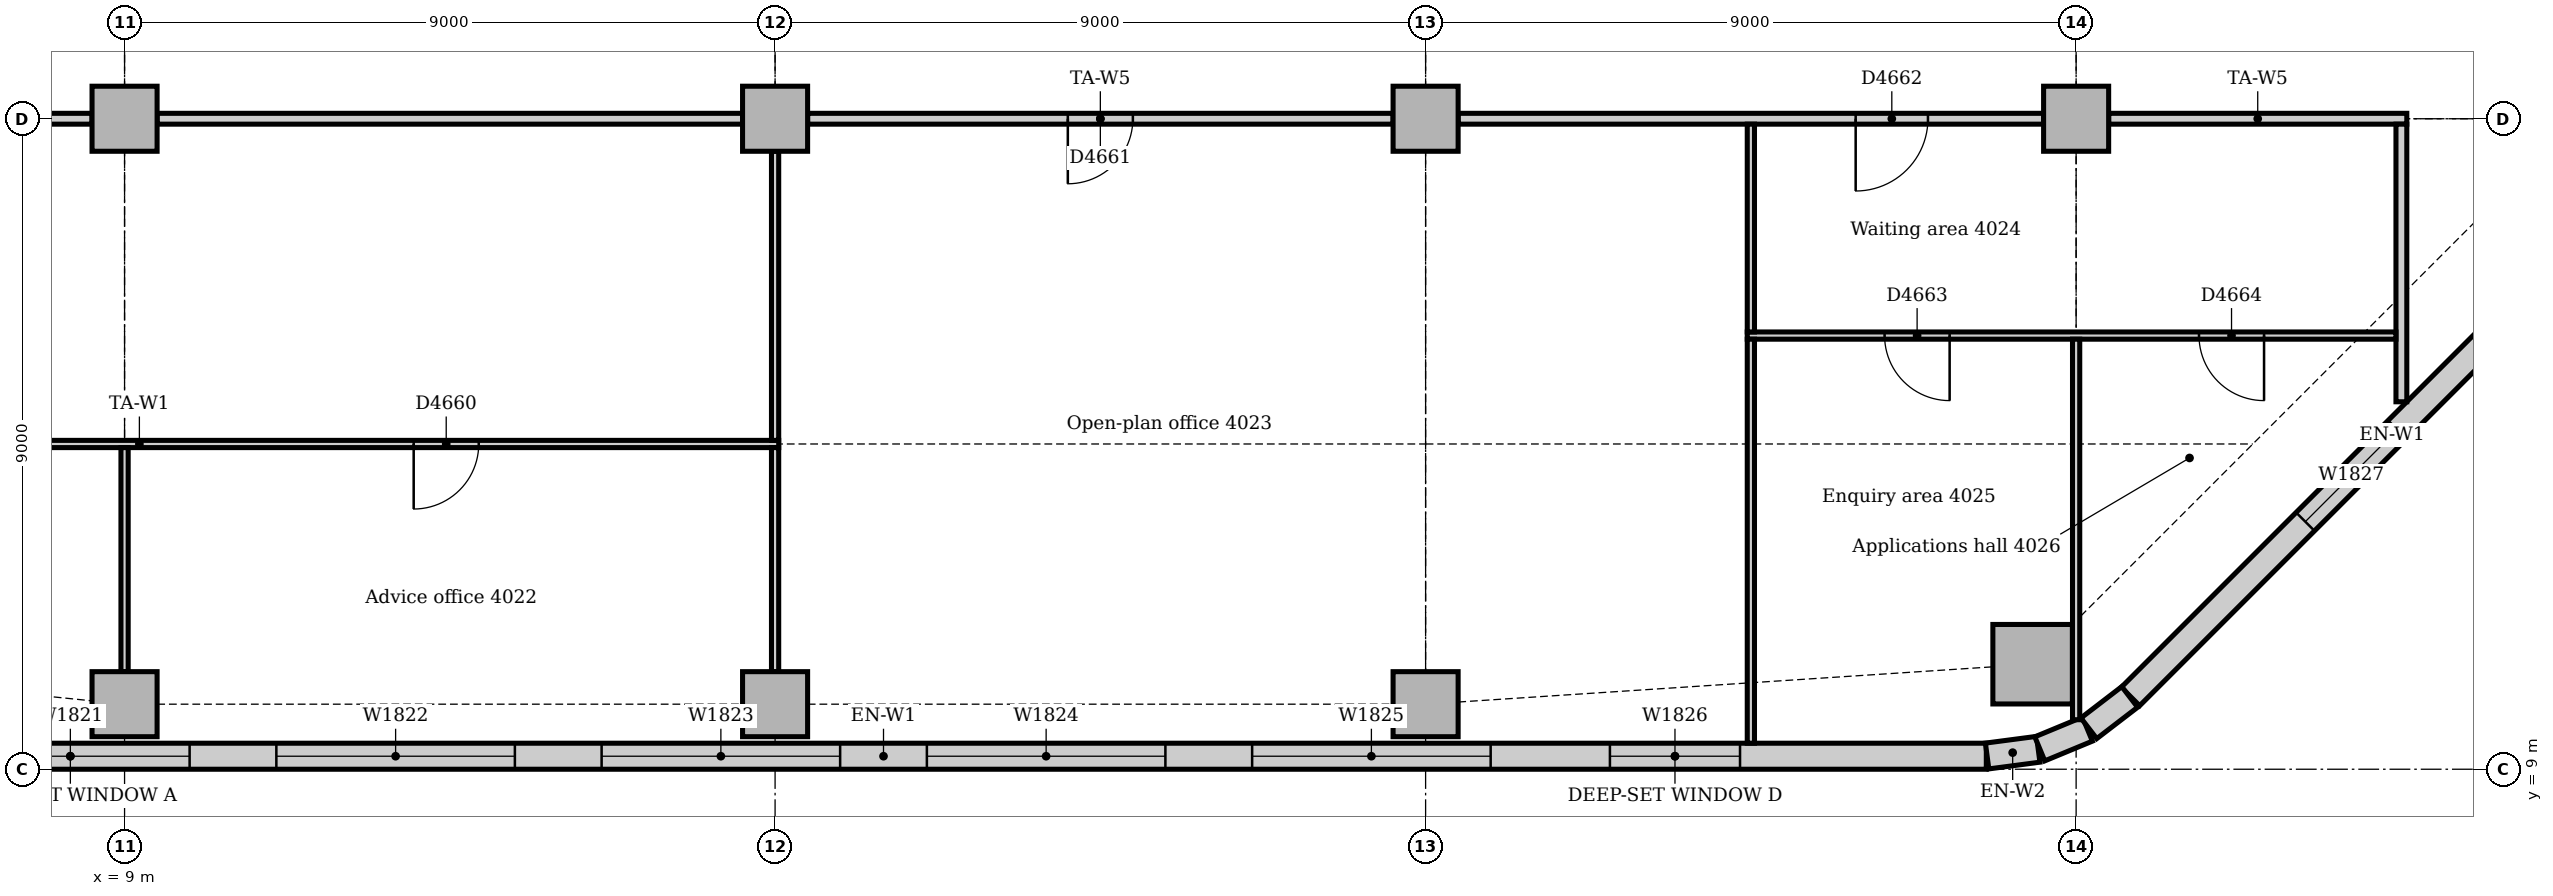
"""IFC4 building model, lengths in metres.
Left out: names, types, materials, properties, quantities, classifications, styles, units other than length and angle.
Written with IfcOpenShell. Run it as: python <this file> out.ifc"""

import sys

from ifc_helpers import new_model, si_unit, direction, frame, frame_2d, origin, origin_2d, place, context, subcontext, project, spatial, rectangle, extrude, element, fill, save


model = new_model("IFC4")
c1 = context("Model", 3, precision=1e-05, world=origin(), true_north=direction((0.0, 1.0)))
c2 = subcontext(c1, "Body", "Model", "MODEL_VIEW")
j1 = project(units=[si_unit("LENGTHUNIT", "METRE"), si_unit("PLANEANGLEUNIT", "RADIAN")], contexts=[c1])
p1 = place(None, origin())
s1 = spatial("IfcSite", under=j1, at=p1, CompositionType="ELEMENT")
p2 = place(p1, origin())
s2 = spatial("IfcBuilding", under=s1, at=p2, CompositionType="ELEMENT")
p3 = place(p2, frame((0.0, 0.0, 169.0)))
s3 = spatial("IfcBuildingStorey", under=s2, at=p3, CompositionType="ELEMENT", Elevation=169.0)
p4 = place(p3, frame((35.398, 10.453, 0.0), z_axis=(0.0, 0.0, 1.0), x_axis=(1.0, 0.0, 0.0)))
e1 = element("IfcColumn", 1, at=p4, inside=s3, PredefinedType="COLUMN", context=c2, shape_type="SweptSolid", body=[
    extrude(rectangle(XDim=1.1, YDim=1.1, at=origin_2d()), origin(), (0.0, 0.0, 1.0), 3.85),
])
for number, where, z_axis, x_axis in (
    (2, (9.0, 9.9, 0.0), (0.0, 0.0, 1.0), (1.0, 0.0, 0.0)),
    (3, (18.0, 9.9, 0.0), (0.0, 0.0, 1.0), (1.0, 0.0, 0.0)),
    (4, (27.0, 9.9, 0.0), (0.0, 0.0, 1.0), (1.0, 0.0, 0.0)),
    (5, (9.0, 18.0, 0.0), (0.0, 0.0, 1.0), (1.0, 0.0, 0.0)),
    (6, (18.0, 18.0, 0.0), (0.0, 0.0, 1.0), (1.0, 0.0, 0.0)),
    (7, (27.0, 18.0, 0.0), (0.0, 0.0, 1.0), (1.0, 0.0, 0.0)),
    (8, (36.0, 18.0, 0.0), (0.0, 0.0, 1.0), (1.0, 0.0, 0.0)),
):
    element("IfcColumn", number, at=place(p3, frame(where, z_axis=z_axis, x_axis=x_axis)), inside=s3, PredefinedType="COLUMN", context=c2, shape_type="SweptSolid", body=[
        extrude(rectangle(XDim=0.9, YDim=0.9, at=origin_2d()), origin(), (0.0, 0.0, 1.0), 3.85),
    ])
p5 = place(p3, frame((4.243, 9.18, 0.0), z_axis=(0.0, 0.0, 1.0), x_axis=(1.0, 0.0, 0.0)))
e9 = element("IfcWall", 9, at=p5, inside=s3, PredefinedType="STANDARD", context=c2, shape_type="SweptSolid", body=[
    extrude(rectangle(XDim=30.515, YDim=0.36, at=frame_2d((15.257, 0.0))), origin(), (0.0, 0.0, 1.0), 3.85),
])
p6 = place(p5, frame((2.357, 0.0, 0.9)))
e10 = element("IfcOpeningElement", 10, at=p6, cuts=e9, PredefinedType="OPENING", context=c2, shape_type="SweptSolid", body=[
    extrude(rectangle(XDim=3.3, YDim=1.6, at=frame_2d((1.65, 0.8))), frame((0.0, 0.19, 0.0), z_axis=(0.0, -1.0, 0.0), x_axis=(1.0, 0.0, 0.0)), (0.0, 0.0, 1.0), 0.38),
])
p7 = place(p5, frame((6.857, 0.0, 0.9)))
e11 = element("IfcOpeningElement", 11, at=p7, cuts=e9, PredefinedType="OPENING", context=c2, shape_type="SweptSolid", body=[
    extrude(rectangle(XDim=3.3, YDim=1.6, at=frame_2d((1.65, 0.8))), frame((0.0, 0.19, 0.0), z_axis=(0.0, -1.0, 0.0), x_axis=(1.0, 0.0, 0.0)), (0.0, 0.0, 1.0), 0.38),
])
p8 = place(p5, frame((11.357, 0.0, 0.9)))
e12 = element("IfcOpeningElement", 12, at=p8, cuts=e9, PredefinedType="OPENING", context=c2, shape_type="SweptSolid", body=[
    extrude(rectangle(XDim=3.3, YDim=1.6, at=frame_2d((1.65, 0.8))), frame((0.0, 0.19, 0.0), z_axis=(0.0, -1.0, 0.0), x_axis=(1.0, 0.0, 0.0)), (0.0, 0.0, 1.0), 0.38),
])
p9 = place(p5, frame((15.857, 0.0, 0.9)))
e13 = element("IfcOpeningElement", 13, at=p9, cuts=e9, PredefinedType="OPENING", context=c2, shape_type="SweptSolid", body=[
    extrude(rectangle(XDim=3.3, YDim=1.6, at=frame_2d((1.65, 0.8))), frame((0.0, 0.19, 0.0), z_axis=(0.0, -1.0, 0.0), x_axis=(1.0, 0.0, 0.0)), (0.0, 0.0, 1.0), 0.38),
])
p10 = place(p5, frame((20.357, 0.0, 0.9)))
e14 = element("IfcOpeningElement", 14, at=p10, cuts=e9, PredefinedType="OPENING", context=c2, shape_type="SweptSolid", body=[
    extrude(rectangle(XDim=3.3, YDim=1.6, at=frame_2d((1.65, 0.8))), frame((0.0, 0.19, 0.0), z_axis=(0.0, -1.0, 0.0), x_axis=(1.0, 0.0, 0.0)), (0.0, 0.0, 1.0), 0.38),
])
p11 = place(p5, frame((25.307, 0.0, 0.9)))
e15 = element("IfcOpeningElement", 15, at=p11, cuts=e9, PredefinedType="OPENING", context=c2, shape_type="SweptSolid", body=[
    extrude(rectangle(XDim=1.8, YDim=1.6, at=frame_2d((0.9, 0.8))), frame((0.0, 0.19, 0.0), z_axis=(0.0, -1.0, 0.0), x_axis=(1.0, 0.0, 0.0)), (0.0, 0.0, 1.0), 0.38),
])
p12 = place(p3, frame((36.751, 10.006, 0.0), z_axis=(0.0, 0.0, 1.0), x_axis=(0.707106781187, 0.707106781187, 0.0)))
e16 = element("IfcWall", 16, at=p12, inside=s3, PredefinedType="STANDARD", context=c2, shape_type="SweptSolid", body=[
    extrude(rectangle(XDim=10.243, YDim=0.36, at=frame_2d((5.121, 0.0))), origin(), (0.0, 0.0, 1.0), 3.85),
])
p13 = place(p12, frame((3.421, 0.0, 0.9)))
e17 = element("IfcOpeningElement", 17, at=p13, cuts=e16, PredefinedType="OPENING", context=c2, shape_type="SweptSolid", body=[
    extrude(rectangle(XDim=1.8, YDim=1.6, at=frame_2d((0.9, 0.8))), frame((0.0, 0.19, 0.0), z_axis=(0.0, -1.0, 0.0), x_axis=(1.0, 0.0, 0.0)), (0.0, 0.0, 1.0), 0.38),
])
for number, where, z_axis, x_axis in (
    (18, (34.769, 9.183, 0.0), (0.0, 0.0, 1.0), (0.991, 0.131, 0.0)),
    (19, (35.497, 9.282, 0.0), (0.0, 0.0, 1.0), (0.924, 0.383, 0.0)),
):
    element("IfcWall", number, at=place(p3, frame(where, z_axis=z_axis, x_axis=x_axis)), inside=s3, PredefinedType="STANDARD", context=c2, shape_type="SweptSolid", body=[
        extrude(rectangle(XDim=0.713, YDim=0.36, at=frame_2d((0.356, 0.0))), origin(), (0.0, 0.0, 1.0), 3.85),
    ])
p14 = place(p3, frame((36.175, 9.566, 0.0), z_axis=(0.0, 0.0, 1.0), x_axis=(0.793321924995, 0.608802368033, 0.0)))
e20 = element("IfcWall", 20, at=p14, inside=s3, PredefinedType="STANDARD", context=c2, shape_type="SweptSolid", body=[
    extrude(rectangle(XDim=0.713, YDim=0.36, at=frame_2d((0.357, 0.0))), origin(), (0.0, 0.0, 1.0), 3.85),
])
p15 = place(p3, frame((1.35, 18.0, 0.0), z_axis=(0.0, 0.0, 1.0), x_axis=(1.0, 0.0, 0.0)))
e21 = element("IfcWall", 21, at=p15, inside=s3, PredefinedType="PARTITIONING", context=c2, shape_type="SweptSolid", body=[
    extrude(rectangle(XDim=7.2, YDim=0.15, at=frame_2d((3.6, 0.0))), origin(), (0.0, 0.0, 1.0), 3.262),
])
p16 = place(p15, frame((3.1, 0.0, 0.0)))
e22 = element("IfcOpeningElement", 22, at=p16, cuts=e21, PredefinedType="OPENING", context=c2, shape_type="SweptSolid", body=[
    extrude(rectangle(XDim=1.0, YDim=2.1, at=frame_2d((0.5, 1.05))), frame((0.0, 0.085, 0.0), z_axis=(0.0, -1.0, 0.0), x_axis=(1.0, 0.0, 0.0)), (0.0, 0.0, 1.0), 0.17),
])
p17 = place(p3, frame((9.45, 18.0, 0.0), z_axis=(0.0, 0.0, 1.0), x_axis=(1.0, 0.0, 0.0)))
e23 = element("IfcWall", 23, at=p17, inside=s3, PredefinedType="PARTITIONING", context=c2, shape_type="SweptSolid", body=[
    extrude(rectangle(XDim=8.1, YDim=0.15, at=frame_2d((4.05, 0.0))), origin(), (0.0, 0.0, 1.0), 3.262),
])
p18 = place(p3, frame((18.45, 18.0, 0.0), z_axis=(0.0, 0.0, 1.0), x_axis=(1.0, 0.0, 0.0)))
e24 = element("IfcWall", 24, at=p18, inside=s3, PredefinedType="PARTITIONING", context=c2, shape_type="SweptSolid", body=[
    extrude(rectangle(XDim=8.1, YDim=0.15, at=frame_2d((4.05, 0.0))), origin(), (0.0, 0.0, 1.0), 3.262),
])
p19 = place(p18, frame((3.6, 0.0, 0.0)))
e25 = element("IfcOpeningElement", 25, at=p19, cuts=e24, PredefinedType="OPENING", context=c2, shape_type="SweptSolid", body=[
    extrude(rectangle(XDim=0.9, YDim=2.1, at=frame_2d((0.45, 1.05))), frame((0.0, 0.085, 0.0), z_axis=(0.0, -1.0, 0.0), x_axis=(1.0, 0.0, 0.0)), (0.0, 0.0, 1.0), 0.17),
])
p20 = place(p3, frame((27.45, 18.0, 0.0), z_axis=(0.0, 0.0, 1.0), x_axis=(1.0, 0.0, 0.0)))
e26 = element("IfcWall", 26, at=p20, inside=s3, PredefinedType="PARTITIONING", context=c2, shape_type="SweptSolid", body=[
    extrude(rectangle(XDim=8.1, YDim=0.15, at=frame_2d((4.05, 0.0))), origin(), (0.0, 0.0, 1.0), 3.262),
])
p21 = place(p20, frame((5.5, 0.0, 0.0)))
e27 = element("IfcOpeningElement", 27, at=p21, cuts=e26, PredefinedType="OPENING", context=c2, shape_type="SweptSolid", body=[
    extrude(rectangle(XDim=1.0, YDim=2.1, at=frame_2d((0.5, 1.05))), frame((0.0, 0.085, 0.0), z_axis=(0.0, -1.0, 0.0), x_axis=(1.0, 0.0, 0.0)), (0.0, 0.0, 1.0), 0.17),
])
p22 = place(p3, frame((36.45, 18.0, 0.0), z_axis=(0.0, 0.0, 1.0), x_axis=(1.0, 0.0, 0.0)))
e28 = element("IfcWall", 28, at=p22, inside=s3, PredefinedType="PARTITIONING", context=c2, shape_type="SweptSolid", body=[
    extrude(rectangle(XDim=4.125, YDim=0.15, at=frame_2d((2.062, 0.0))), origin(), (0.0, 0.0, 1.0), 3.35),
])
p23 = place(p3, frame((40.5, 14.084, 0.0), z_axis=(0.0, 0.0, 1.0), x_axis=(0.0, 1.0, 0.0)))
e29 = element("IfcWall", 29, at=p23, inside=s3, PredefinedType="PARTITIONING", context=c2, shape_type="SweptSolid", body=[
    extrude(rectangle(XDim=3.841, YDim=0.15, at=frame_2d((1.921, 0.0))), origin(), (0.0, 0.0, 1.0), 3.85),
])
p24 = place(p3, frame((0.36, 13.5, 0.0), z_axis=(0.0, 0.0, 1.0), x_axis=(1.0, 0.0, 0.0)))
e30 = element("IfcWall", 30, at=p24, inside=s3, PredefinedType="PARTITIONING", context=c2, shape_type="SweptSolid", body=[
    extrude(rectangle(XDim=17.69, YDim=0.1, at=frame_2d((8.845, 0.0))), origin(), (0.0, 0.0, 1.0), 3.4),
])
p25 = place(p24, frame((3.95, 0.0, 0.0)))
e31 = element("IfcOpeningElement", 31, at=p25, cuts=e30, PredefinedType="OPENING", context=c2, shape_type="SweptSolid", body=[
    extrude(rectangle(XDim=0.9, YDim=2.1, at=frame_2d((0.45, 1.05))), frame((0.0, 0.06, 0.0), z_axis=(0.0, -1.0, 0.0), x_axis=(1.0, 0.0, 0.0)), (0.0, 0.0, 1.0), 0.12),
])
p26 = place(p24, frame((12.64, 0.0, 0.0)))
e32 = element("IfcOpeningElement", 32, at=p26, cuts=e30, PredefinedType="OPENING", context=c2, shape_type="SweptSolid", body=[
    extrude(rectangle(XDim=0.9, YDim=2.1, at=frame_2d((0.45, 1.05))), frame((0.0, 0.06, 0.0), z_axis=(0.0, -1.0, 0.0), x_axis=(1.0, 0.0, 0.0)), (0.0, 0.0, 1.0), 0.12),
])
p27 = place(p3, frame((31.45, 15.0, 0.0), z_axis=(0.0, 0.0, 1.0), x_axis=(1.0, 0.0, 0.0)))
e33 = element("IfcWall", 33, at=p27, inside=s3, PredefinedType="PARTITIONING", context=c2, shape_type="SweptSolid", body=[
    extrude(rectangle(XDim=8.975, YDim=0.1, at=frame_2d((4.487, 0.0))), origin(), (0.0, 0.0, 1.0), 3.85),
])
p28 = place(p27, frame((1.9, 0.0, 0.0)))
e34 = element("IfcOpeningElement", 34, at=p28, cuts=e33, PredefinedType="OPENING", context=c2, shape_type="SweptSolid", body=[
    extrude(rectangle(XDim=0.9, YDim=2.1, at=frame_2d((0.45, 1.05))), frame((0.0, 0.06, 0.0), z_axis=(0.0, -1.0, 0.0), x_axis=(1.0, 0.0, 0.0)), (0.0, 0.0, 1.0), 0.12),
])
p29 = place(p27, frame((6.25, 0.0, 0.0)))
e35 = element("IfcOpeningElement", 35, at=p29, cuts=e33, PredefinedType="OPENING", context=c2, shape_type="SweptSolid", body=[
    extrude(rectangle(XDim=0.9, YDim=2.1, at=frame_2d((0.45, 1.05))), frame((0.0, 0.06, 0.0), z_axis=(0.0, -1.0, 0.0), x_axis=(1.0, 0.0, 0.0)), (0.0, 0.0, 1.0), 0.12),
])
p30 = place(p3, frame((18.0, 10.35, 0.0), z_axis=(0.0, 0.0, 1.0), x_axis=(0.0, 1.0, 0.0)))
e36 = element("IfcWall", 36, at=p30, inside=s3, PredefinedType="PARTITIONING", context=c2, shape_type="SweptSolid", body=[
    extrude(rectangle(XDim=3.1, YDim=0.1, at=frame_2d((1.55, 0.0))), origin(), (0.0, 0.0, 1.0), 3.362),
])
p31 = place(p3, frame((18.0, 13.55, 0.0), z_axis=(0.0, 0.0, 1.0), x_axis=(0.0, 1.0, 0.0)))
e37 = element("IfcWall", 37, at=p31, inside=s3, PredefinedType="PARTITIONING", context=c2, shape_type="SweptSolid", body=[
    extrude(rectangle(XDim=4.0, YDim=0.1, at=frame_2d((2.0, 0.0))), origin(), (0.0, 0.0, 1.0), 3.362),
])
p32 = place(p3, frame((31.5, 15.05, 0.0), z_axis=(0.0, 0.0, 1.0), x_axis=(0.0, 1.0, 0.0)))
e38 = element("IfcWall", 38, at=p32, inside=s3, PredefinedType="PARTITIONING", context=c2, shape_type="SweptSolid", body=[
    extrude(rectangle(XDim=2.875, YDim=0.1, at=frame_2d((1.438, 0.0))), origin(), (0.0, 0.0, 1.0), 3.85),
])
p33 = place(p3, frame((31.5, 9.36, 0.0), z_axis=(0.0, 0.0, 1.0), x_axis=(0.0, 1.0, 0.0)))
e39 = element("IfcWall", 39, at=p33, inside=s3, PredefinedType="PARTITIONING", context=c2, shape_type="SweptSolid", body=[
    extrude(rectangle(XDim=5.59, YDim=0.1, at=frame_2d((2.795, 0.0))), origin(), (0.0, 0.0, 1.0), 3.85),
])
p34 = place(p3, frame((36.0, 9.685, 0.0), z_axis=(0.0, 0.0, 1.0), x_axis=(0.0, 1.0, 0.0)))
e40 = element("IfcWall", 40, at=p34, inside=s3, PredefinedType="PARTITIONING", context=c2, shape_type="SweptSolid", body=[
    extrude(rectangle(XDim=5.265, YDim=0.1, at=frame_2d((2.632, 0.0))), origin(), (0.0, 0.0, 1.0), 3.35),
])
p35 = place(p3, frame((9.0, 10.35, 0.0), z_axis=(0.0, 0.0, 1.0), x_axis=(0.0, 1.0, 0.0)))
e41 = element("IfcWall", 41, at=p35, inside=s3, PredefinedType="PARTITIONING", context=c2, shape_type="SweptSolid", body=[
    extrude(rectangle(XDim=3.1, YDim=0.1, at=frame_2d((1.55, 0.0))), origin(), (0.0, 0.0, 1.0), 3.362),
])
p36 = place(p6, origin())
e42 = element("IfcWindow", 42, at=p36, inside=s3, PartitioningType="SINGLE_PANEL", PredefinedType="WINDOW", context=c2, shape_type="SweptSolid", body=[
    extrude(rectangle(XDim=3.3, YDim=1.6, at=frame_2d((1.65, 0.8))), frame((0.0, 0.13, 0.0), z_axis=(0.0, -1.0, 0.0), x_axis=(1.0, 0.0, 0.0)), (0.0, 0.0, 1.0), 0.06),
])
fill(e10, e42)
p37 = place(p7, origin())
e43 = element("IfcWindow", 43, at=p37, inside=s3, PartitioningType="SINGLE_PANEL", PredefinedType="WINDOW", context=c2, shape_type="SweptSolid", body=[
    extrude(rectangle(XDim=3.3, YDim=1.6, at=frame_2d((1.65, 0.8))), frame((0.0, 0.13, 0.0), z_axis=(0.0, -1.0, 0.0), x_axis=(1.0, 0.0, 0.0)), (0.0, 0.0, 1.0), 0.06),
])
fill(e11, e43)
p38 = place(p8, origin())
e44 = element("IfcWindow", 44, at=p38, inside=s3, PartitioningType="SINGLE_PANEL", PredefinedType="WINDOW", context=c2, shape_type="SweptSolid", body=[
    extrude(rectangle(XDim=3.3, YDim=1.6, at=frame_2d((1.65, 0.8))), frame((0.0, 0.13, 0.0), z_axis=(0.0, -1.0, 0.0), x_axis=(1.0, 0.0, 0.0)), (0.0, 0.0, 1.0), 0.06),
])
fill(e12, e44)
p39 = place(p9, origin())
e45 = element("IfcWindow", 45, at=p39, inside=s3, PartitioningType="SINGLE_PANEL", PredefinedType="WINDOW", context=c2, shape_type="SweptSolid", body=[
    extrude(rectangle(XDim=3.3, YDim=1.6, at=frame_2d((1.65, 0.8))), frame((0.0, 0.13, 0.0), z_axis=(0.0, -1.0, 0.0), x_axis=(1.0, 0.0, 0.0)), (0.0, 0.0, 1.0), 0.06),
])
fill(e13, e45)
p40 = place(p10, origin())
e46 = element("IfcWindow", 46, at=p40, inside=s3, PartitioningType="SINGLE_PANEL", PredefinedType="WINDOW", context=c2, shape_type="SweptSolid", body=[
    extrude(rectangle(XDim=3.3, YDim=1.6, at=frame_2d((1.65, 0.8))), frame((0.0, 0.13, 0.0), z_axis=(0.0, -1.0, 0.0), x_axis=(1.0, 0.0, 0.0)), (0.0, 0.0, 1.0), 0.06),
])
fill(e14, e46)
p41 = place(p11, origin())
e47 = element("IfcWindow", 47, at=p41, inside=s3, PartitioningType="SINGLE_PANEL", PredefinedType="WINDOW", context=c2, shape_type="SweptSolid", body=[
    extrude(rectangle(XDim=1.8, YDim=1.6, at=frame_2d((0.9, 0.8))), frame((0.0, 0.13, 0.0), z_axis=(0.0, -1.0, 0.0), x_axis=(1.0, 0.0, 0.0)), (0.0, 0.0, 1.0), 0.06),
])
fill(e15, e47)
p42 = place(p13, origin())
e48 = element("IfcWindow", 48, at=p42, inside=s3, PartitioningType="SINGLE_PANEL", PredefinedType="WINDOW", context=c2, shape_type="SweptSolid", body=[
    extrude(rectangle(XDim=1.8, YDim=1.6, at=frame_2d((0.9, 0.8))), frame((0.0, 0.13, 0.0), z_axis=(0.0, -1.0, 0.0), x_axis=(1.0, 0.0, 0.0)), (0.0, 0.0, 1.0), 0.06),
])
fill(e17, e48)
p43 = place(p26, frame((0.9, 0.0, 0.0), z_axis=(0.0, 0.0, 1.0), x_axis=(-1.0, 0.0, 0.0)))
e49 = element("IfcDoor", 49, at=p43, inside=s3, OperationType="SINGLE_SWING_RIGHT", PredefinedType="DOOR", context=c2, shape_type="SweptSolid", body=[
    extrude(rectangle(XDim=0.9, YDim=2.1, at=frame_2d((0.45, 1.05))), frame((0.0, 0.025, 0.0), z_axis=(0.0, -1.0, 0.0), x_axis=(1.0, 0.0, 0.0)), (0.0, 0.0, 1.0), 0.05),
])
fill(e32, e49)
p44 = place(p19, frame((0.9, 0.0, 0.0), z_axis=(0.0, 0.0, 1.0), x_axis=(-1.0, 0.0, 0.0)))
e50 = element("IfcDoor", 50, at=p44, inside=s3, OperationType="SINGLE_SWING_RIGHT", PredefinedType="DOOR", context=c2, shape_type="SweptSolid", body=[
    extrude(rectangle(XDim=0.9, YDim=2.1, at=frame_2d((0.45, 1.05))), frame((0.0, 0.025, 0.0), z_axis=(0.0, -1.0, 0.0), x_axis=(1.0, 0.0, 0.0)), (0.0, 0.0, 1.0), 0.05),
])
fill(e25, e50)
p45 = place(p21, frame((1.0, 0.0, 0.0), z_axis=(0.0, 0.0, 1.0), x_axis=(-1.0, 0.0, 0.0)))
e51 = element("IfcDoor", 51, at=p45, inside=s3, OperationType="SINGLE_SWING_RIGHT", PredefinedType="DOOR", context=c2, shape_type="SweptSolid", body=[
    extrude(rectangle(XDim=1.0, YDim=2.1, at=frame_2d((0.5, 1.05))), frame((0.0, 0.025, 0.0), z_axis=(0.0, -1.0, 0.0), x_axis=(1.0, 0.0, 0.0)), (0.0, 0.0, 1.0), 0.05),
])
fill(e27, e51)
p46 = place(p28, frame((0.9, 0.0, 0.0), z_axis=(0.0, 0.0, 1.0), x_axis=(-1.0, 0.0, 0.0)))
e52 = element("IfcDoor", 52, at=p46, inside=s3, OperationType="SINGLE_SWING_LEFT", PredefinedType="DOOR", context=c2, shape_type="SweptSolid", body=[
    extrude(rectangle(XDim=0.9, YDim=2.1, at=frame_2d((0.45, 1.05))), frame((0.0, 0.025, 0.0), z_axis=(0.0, -1.0, 0.0), x_axis=(1.0, 0.0, 0.0)), (0.0, 0.0, 1.0), 0.05),
])
fill(e34, e52)
p47 = place(p29, frame((0.9, 0.0, 0.0), z_axis=(0.0, 0.0, 1.0), x_axis=(-1.0, 0.0, 0.0)))
e53 = element("IfcDoor", 53, at=p47, inside=s3, OperationType="SINGLE_SWING_LEFT", PredefinedType="DOOR", context=c2, shape_type="SweptSolid", body=[
    extrude(rectangle(XDim=0.9, YDim=2.1, at=frame_2d((0.45, 1.05))), frame((0.0, 0.025, 0.0), z_axis=(0.0, -1.0, 0.0), x_axis=(1.0, 0.0, 0.0)), (0.0, 0.0, 1.0), 0.05),
])
fill(e35, e53)
save(model, sys.argv[1])
